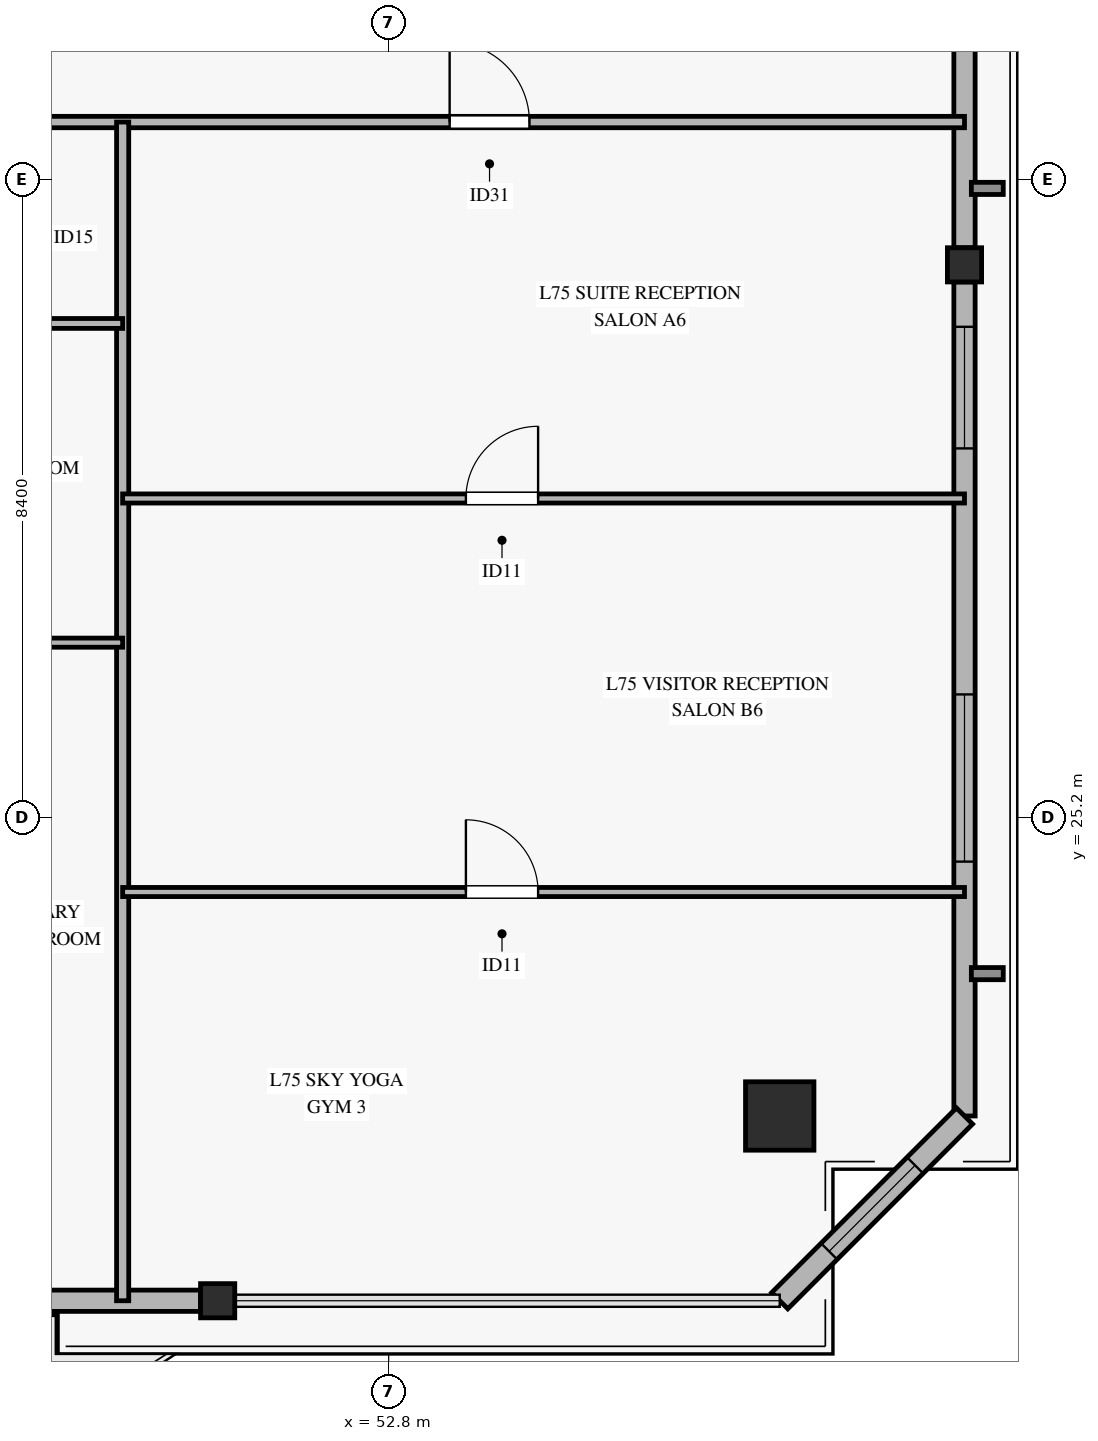
"""IFC4 building model, lengths in metres.
Left out: names, types, materials, properties, quantities, classifications, styles, units other than length and angle.
Written with IfcOpenShell. Run it as: python <this file> out.ifc"""

import sys

from ifc_helpers import new_model, si_unit, direction, frame, frame_2d, origin, origin_2d, place, context, subcontext, project, spatial, rectangle, hollow_rectangle, extrude, source, transform, mapped, element, fill, save


model = new_model("IFC4")
c1 = context("Model", 3, precision=1e-05, world=origin(), true_north=direction((0.0, 1.0)))
c2 = subcontext(c1, "Body", "Model", "MODEL_VIEW")
j1 = project(units=[si_unit("LENGTHUNIT", "METRE"), si_unit("PLANEANGLEUNIT", "RADIAN")], contexts=[c1])
p1 = place(None, origin())
s1 = spatial("IfcSite", under=j1, at=p1, CompositionType="ELEMENT")
p2 = place(p1, origin())
s2 = spatial("IfcBuilding", under=s1, at=p2, CompositionType="ELEMENT")
p3 = place(p2, frame((0.0, 0.0, 293.8)))
s3 = spatial("IfcBuildingStorey", under=s2, at=p3, CompositionType="ELEMENT", Elevation=293.8)
m1 = source(origin(), c2, "Body", "SweptSolid", [
    extrude(hollow_rectangle(XDim=0.9, YDim=0.9, WallThickness=0.04, at=origin_2d()), origin(), (0.0, 0.0, 1.0), 3.185),
])
p4 = place(p3, frame((57.945, 21.272, 0.0), z_axis=(0.0, 0.0, 1.0), x_axis=(1.0, 0.0, 0.0)))
e1 = element("IfcColumn", 1, at=p4, inside=s3, PredefinedType="COLUMN", context=c2, shape_type="MappedRepresentation", body=[
    mapped(m1, transform((0.0, 0.0, 0.0), x_axis=(1.0, 0.0, 0.0), y_axis=(0.0, 1.0, 0.0), z_axis=(0.0, 0.0, 1.0), scale=1.0)),
])
m2 = source(origin(), c2, "Body", "SweptSolid", [
    extrude(hollow_rectangle(XDim=0.45, YDim=0.45, WallThickness=0.022, at=origin_2d()), origin(), (0.0, 0.0, 1.0), 3.185),
])
for number, where, z_axis, x_axis in (
    (2, (50.55, 18.841, 0.0), (0.0, 0.0, 1.0), (1.0, 0.0, 0.0)),
    (3, (60.376, 32.471, 0.0), (0.0, 0.0, 1.0), (1.0, 0.0, 0.0)),
):
    element("IfcColumn", number, at=place(p3, frame(where, z_axis=z_axis, x_axis=x_axis)), inside=s3, PredefinedType="COLUMN", context=c2, shape_type="MappedRepresentation", body=[
        mapped(m2, transform((0.0, 0.0, 0.0), x_axis=(1.0, 0.0, 0.0), y_axis=(0.0, 1.0, 0.0), z_axis=(0.0, 0.0, 1.0), scale=1.0)),
    ])
p5 = place(p3, frame((44.525, 18.841, 0.0), z_axis=(0.0, 0.0, 1.0), x_axis=(1.0, 0.0, 0.0)))
e4 = element("IfcWall", 4, at=p5, inside=s3, PredefinedType="SOLIDWALL", context=c2, shape_type="SweptSolid", body=[
    extrude(rectangle(XDim=5.8, YDim=0.28, at=frame_2d((2.9, 0.0))), origin(), (0.0, 0.0, 1.0), 2.815),
])
p6 = place(p5, frame((1.975, 0.0, 0.0)))
e5 = element("IfcOpeningElement", 5, at=p6, cuts=e4, PredefinedType="OPENING", context=c2, shape_type="SweptSolid", body=[
    extrude(rectangle(XDim=1.8, YDim=2.25, at=frame_2d((0.9, 1.125))), frame((0.0, 0.15, 0.0), z_axis=(0.0, -1.0, 0.0), x_axis=(1.0, 0.0, 0.0)), (0.0, 0.0, 1.0), 0.3),
])
p7 = place(p3, frame((60.376, 21.272, 0.0), z_axis=(0.0, 0.0, 1.0), x_axis=(0.0, 1.0, 0.0)))
e6 = element("IfcWall", 6, at=p7, inside=s3, PredefinedType="SOLIDWALL", context=c2, shape_type="SweptSolid", body=[
    extrude(rectangle(XDim=10.974, YDim=0.28, at=frame_2d((5.487, 0.0))), origin(), (0.0, 0.0, 1.0), 2.815),
])
p8 = place(p7, frame((3.347, 0.0, 0.45)))
e7 = element("IfcOpeningElement", 7, at=p8, cuts=e6, PredefinedType="OPENING", context=c2, shape_type="SweptSolid", body=[
    extrude(rectangle(XDim=2.2, YDim=2.1, at=frame_2d((1.1, 1.05))), frame((0.0, 0.15, 0.0), z_axis=(0.0, -1.0, 0.0), x_axis=(1.0, 0.0, 0.0)), (0.0, 0.0, 1.0), 0.3),
])
p9 = place(p7, frame((8.784, 0.0, 0.45)))
e8 = element("IfcOpeningElement", 8, at=p9, cuts=e6, PredefinedType="OPENING", context=c2, shape_type="SweptSolid", body=[
    extrude(rectangle(XDim=1.6, YDim=2.0, at=frame_2d((0.8, 1.0))), frame((0.0, 0.15, 0.0), z_axis=(0.0, -1.0, 0.0), x_axis=(1.0, 0.0, 0.0)), (0.0, 0.0, 1.0), 0.3),
])
p10 = place(p3, frame((60.376, 32.696, 0.0), z_axis=(0.0, 0.0, 1.0), x_axis=(0.0, 1.0, 0.0)))
e9 = element("IfcWall", 9, at=p10, inside=s3, PredefinedType="SOLIDWALL", context=c2, shape_type="SweptSolid", body=[
    extrude(rectangle(XDim=10.973, YDim=0.28, at=frame_2d((5.486, 0.0))), origin(), (0.0, 0.0, 1.0), 2.815),
])
p11 = place(p3, frame((57.945, 18.841, 0.0), z_axis=(0.0, 0.0, 1.0), x_axis=(0.707106781187, 0.707106781187, 0.0)))
e10 = element("IfcWall", 10, at=p11, inside=s3, PredefinedType="SOLIDWALL", context=c2, shape_type="SweptSolid", body=[
    extrude(rectangle(XDim=3.438, YDim=0.3, at=frame_2d((1.719, 0.0))), origin(), (0.0, 0.0, 1.0), 2.815),
])
p12 = place(p11, frame((0.919, 0.0, 0.45)))
e11 = element("IfcOpeningElement", 11, at=p12, cuts=e10, PredefinedType="OPENING", context=c2, shape_type="SweptSolid", body=[
    extrude(rectangle(XDim=1.6, YDim=2.0, at=frame_2d((0.8, 1.0))), frame((0.0, 0.16, 0.0), z_axis=(0.0, -1.0, 0.0), x_axis=(1.0, 0.0, 0.0)), (0.0, 0.0, 1.0), 0.32),
])
p13 = place(p3, frame((10.024, 34.35, 0.0), z_axis=(0.0, 0.0, 1.0), x_axis=(1.0, 0.0, 0.0)))
e12 = element("IfcWall", 12, at=p13, inside=s3, PredefinedType="PARTITIONING", context=c2, shape_type="SweptSolid", body=[
    extrude(rectangle(XDim=50.352, YDim=0.15, at=frame_2d((25.176, 0.0))), origin(), (0.0, 0.0, 1.0), 2.47),
])
p14 = place(p13, frame((5.148, 0.0, 0.0)))
e13 = element("IfcOpeningElement", 13, at=p14, cuts=e12, PredefinedType="OPENING", context=c2, shape_type="SweptSolid", body=[
    extrude(rectangle(XDim=1.05, YDim=2.15, at=frame_2d((0.525, 1.075))), frame((0.0, 0.085, 0.0), z_axis=(0.0, -1.0, 0.0), x_axis=(1.0, 0.0, 0.0)), (0.0, 0.0, 1.0), 0.17),
])
p15 = place(p13, frame((15.651, 0.0, 0.0)))
e14 = element("IfcOpeningElement", 14, at=p15, cuts=e12, PredefinedType="OPENING", context=c2, shape_type="SweptSolid", body=[
    extrude(rectangle(XDim=1.05, YDim=2.15, at=frame_2d((0.525, 1.075))), frame((0.0, 0.085, 0.0), z_axis=(0.0, -1.0, 0.0), x_axis=(1.0, 0.0, 0.0)), (0.0, 0.0, 1.0), 0.17),
])
p16 = place(p13, frame((22.129, 0.0, 0.0)))
e15 = element("IfcOpeningElement", 15, at=p16, cuts=e12, PredefinedType="OPENING", context=c2, shape_type="SweptSolid", body=[
    extrude(rectangle(XDim=1.05, YDim=2.15, at=frame_2d((0.525, 1.075))), frame((0.0, 0.085, 0.0), z_axis=(0.0, -1.0, 0.0), x_axis=(1.0, 0.0, 0.0)), (0.0, 0.0, 1.0), 0.17),
])
p17 = place(p13, frame((29.151, 0.0, 0.0)))
e16 = element("IfcOpeningElement", 16, at=p17, cuts=e12, PredefinedType="OPENING", context=c2, shape_type="SweptSolid", body=[
    extrude(rectangle(XDim=1.05, YDim=2.15, at=frame_2d((0.525, 1.075))), frame((0.0, 0.085, 0.0), z_axis=(0.0, -1.0, 0.0), x_axis=(1.0, 0.0, 0.0)), (0.0, 0.0, 1.0), 0.17),
])
p18 = place(p13, frame((35.701, 0.0, 0.0)))
e17 = element("IfcOpeningElement", 17, at=p18, cuts=e12, PredefinedType="OPENING", context=c2, shape_type="SweptSolid", body=[
    extrude(rectangle(XDim=1.05, YDim=2.15, at=frame_2d((0.525, 1.075))), frame((0.0, 0.085, 0.0), z_axis=(0.0, -1.0, 0.0), x_axis=(1.0, 0.0, 0.0)), (0.0, 0.0, 1.0), 0.17),
])
p19 = place(p13, frame((43.578, 0.0, 0.0)))
e18 = element("IfcOpeningElement", 18, at=p19, cuts=e12, PredefinedType="OPENING", context=c2, shape_type="SweptSolid", body=[
    extrude(rectangle(XDim=1.05, YDim=2.15, at=frame_2d((0.525, 1.075))), frame((0.0, 0.085, 0.0), z_axis=(0.0, -1.0, 0.0), x_axis=(1.0, 0.0, 0.0)), (0.0, 0.0, 1.0), 0.17),
])
p20 = place(p3, frame((49.3, 18.841, 0.0), z_axis=(0.0, 0.0, 1.0), x_axis=(0.0, 1.0, 0.0)))
e19 = element("IfcWall", 19, at=p20, inside=s3, PredefinedType="PARTITIONING", context=c2, shape_type="SweptSolid", body=[
    extrude(rectangle(XDim=15.509, YDim=0.16, at=frame_2d((7.754, 0.0))), origin(), (0.0, 0.0, 1.0), 2.77),
])
p21 = place(p3, frame((47.685, 31.7, 0.0), z_axis=(0.0, 0.0, 1.0), x_axis=(1.0, 0.0, 0.0)))
e20 = element("IfcWall", 20, at=p21, inside=s3, PredefinedType="PARTITIONING", context=c2, shape_type="SweptSolid", body=[
    extrude(rectangle(XDim=1.615, YDim=0.13, at=frame_2d((0.808, 0.0))), origin(), (0.0, 0.0, 1.0), 3.185),
])
p22 = place(p3, frame((45.72, 27.5, 0.0), z_axis=(0.0, 0.0, 1.0), x_axis=(1.0, 0.0, 0.0)))
e21 = element("IfcWall", 21, at=p22, inside=s3, PredefinedType="PARTITIONING", context=c2, shape_type="SweptSolid", body=[
    extrude(rectangle(XDim=3.58, YDim=0.12, at=frame_2d((1.79, 0.0))), origin(), (0.0, 0.0, 1.0), 3.185),
])
p23 = place(p3, frame((49.3, 24.219, 0.0), z_axis=(0.0, 0.0, 1.0), x_axis=(1.0, 0.0, 0.0)))
e22 = element("IfcWall", 22, at=p23, inside=s3, PredefinedType="PARTITIONING", context=c2, shape_type="SweptSolid", body=[
    extrude(rectangle(XDim=11.076, YDim=0.12, at=frame_2d((5.538, 0.0))), origin(), (0.0, 0.0, 1.0), 2.47),
])
p24 = place(p23, frame((4.516, 0.0, 0.0)))
e23 = element("IfcOpeningElement", 23, at=p24, cuts=e22, PredefinedType="OPENING", context=c2, shape_type="SweptSolid", body=[
    extrude(rectangle(XDim=0.95, YDim=2.1, at=frame_2d((0.475, 1.05))), frame((0.0, 0.07, 0.0), z_axis=(0.0, -1.0, 0.0), x_axis=(1.0, 0.0, 0.0)), (0.0, 0.0, 1.0), 0.14),
])
p25 = place(p3, frame((49.3, 29.397, 0.0), z_axis=(0.0, 0.0, 1.0), x_axis=(1.0, 0.0, 0.0)))
e24 = element("IfcWall", 24, at=p25, inside=s3, PredefinedType="PARTITIONING", context=c2, shape_type="SweptSolid", body=[
    extrude(rectangle(XDim=11.076, YDim=0.12, at=frame_2d((5.538, 0.0))), origin(), (0.0, 0.0, 1.0), 2.47),
])
p26 = place(p25, frame((4.516, 0.0, 0.0)))
e25 = element("IfcOpeningElement", 25, at=p26, cuts=e24, PredefinedType="OPENING", context=c2, shape_type="SweptSolid", body=[
    extrude(rectangle(XDim=0.95, YDim=2.1, at=frame_2d((0.475, 1.05))), frame((0.0, 0.07, 0.0), z_axis=(0.0, -1.0, 0.0), x_axis=(1.0, 0.0, 0.0)), (0.0, 0.0, 1.0), 0.14),
])
m3 = source(origin(), c2, "Body", "SweptSolid", [
    extrude(rectangle(XDim=2.2, YDim=2.1, at=frame_2d((1.1, 1.05))), frame((0.0, 0.03, 0.0), z_axis=(0.0, -1.0, 0.0), x_axis=(1.0, 0.0, 0.0)), (0.0, 0.0, 1.0), 0.06),
])
p27 = place(p8, origin())
e26 = element("IfcWindow", 26, at=p27, inside=s3, PartitioningType="SINGLE_PANEL", PredefinedType="WINDOW", context=c2, shape_type="MappedRepresentation", body=[
    mapped(m3, transform((0.0, 0.0, 0.0), x_axis=(1.0, 0.0, 0.0), y_axis=(0.0, 1.0, 0.0), z_axis=(0.0, 0.0, 1.0), scale=1.0)),
])
fill(e7, e26)
m4 = source(origin(), c2, "Body", "SweptSolid", [
    extrude(rectangle(XDim=1.6, YDim=2.0, at=frame_2d((0.8, 1.0))), frame((0.0, 0.03, 0.0), z_axis=(0.0, -1.0, 0.0), x_axis=(1.0, 0.0, 0.0)), (0.0, 0.0, 1.0), 0.06),
])
p28 = place(p9, origin())
e27 = element("IfcWindow", 27, at=p28, inside=s3, PartitioningType="SINGLE_PANEL", PredefinedType="WINDOW", context=c2, shape_type="MappedRepresentation", body=[
    mapped(m4, transform((0.0, 0.0, 0.0), x_axis=(1.0, 0.0, 0.0), y_axis=(0.0, 1.0, 0.0), z_axis=(0.0, 0.0, 1.0), scale=1.0)),
])
fill(e8, e27)
p29 = place(p12, origin())
e28 = element("IfcWindow", 28, at=p29, inside=s3, PartitioningType="SINGLE_PANEL", PredefinedType="WINDOW", context=c2, shape_type="MappedRepresentation", body=[
    mapped(m4, transform((0.0, 0.0, 0.0), x_axis=(1.0, 0.0, 0.0), y_axis=(0.0, 1.0, 0.0), z_axis=(0.0, 0.0, 1.0), scale=1.0)),
])
fill(e11, e28)
m5 = source(origin(), c2, "Body", "SweptSolid", [
    extrude(rectangle(XDim=1.05, YDim=2.15, at=frame_2d((0.525, 1.075))), frame((0.0, 0.025, 0.0), z_axis=(0.0, -1.0, 0.0), x_axis=(1.0, 0.0, 0.0)), (0.0, 0.0, 1.0), 0.05),
])
p30 = place(p19, origin())
e29 = element("IfcDoor", 29, at=p30, inside=s3, OperationType="SINGLE_SWING_LEFT", PredefinedType="DOOR", context=c2, shape_type="MappedRepresentation", body=[
    mapped(m5, transform((0.0, 0.0, 0.0), x_axis=(1.0, 0.0, 0.0), y_axis=(0.0, 1.0, 0.0), z_axis=(0.0, 0.0, 1.0), scale=1.0)),
])
fill(e18, e29)
m6 = source(origin(), c2, "Body", "SweptSolid", [
    extrude(rectangle(XDim=0.95, YDim=2.1, at=frame_2d((0.475, 1.05))), frame((0.0, 0.025, 0.0), z_axis=(0.0, -1.0, 0.0), x_axis=(1.0, 0.0, 0.0)), (0.0, 0.0, 1.0), 0.05),
])
p31 = place(p26, origin())
e30 = element("IfcDoor", 30, at=p31, inside=s3, OperationType="SINGLE_SWING_RIGHT", PredefinedType="DOOR", context=c2, shape_type="MappedRepresentation", body=[
    mapped(m6, transform((0.0, 0.0, 0.0), x_axis=(1.0, 0.0, 0.0), y_axis=(0.0, 1.0, 0.0), z_axis=(0.0, 0.0, 1.0), scale=1.0)),
])
fill(e25, e30)
p32 = place(p24, origin())
e31 = element("IfcDoor", 31, at=p32, inside=s3, OperationType="SINGLE_SWING_LEFT", PredefinedType="DOOR", context=c2, shape_type="MappedRepresentation", body=[
    mapped(m6, transform((0.0, 0.0, 0.0), x_axis=(1.0, 0.0, 0.0), y_axis=(0.0, 1.0, 0.0), z_axis=(0.0, 0.0, 1.0), scale=1.0)),
])
fill(e23, e31)
save(model, sys.argv[1])
